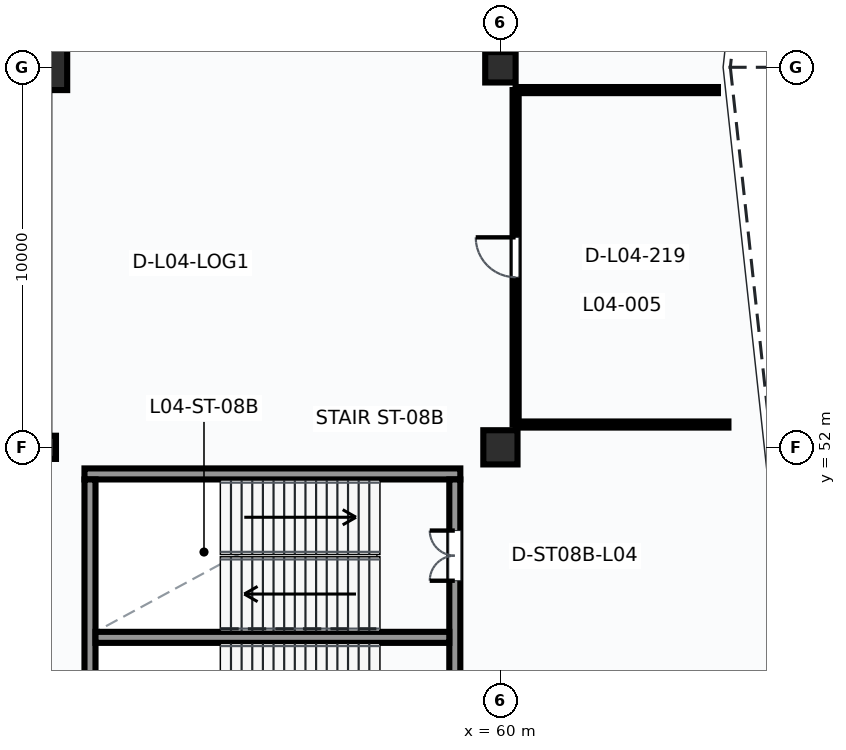
"""IFC4 building model, lengths in metres.
Left out: names, types, materials, properties, quantities, classifications, styles, units other than length and angle.
Written with IfcOpenShell. Run it as: python <this file> out.ifc"""

import sys

from ifc_helpers import new_model, si_unit, direction, frame, frame_2d, origin, origin_2d, place, context, subcontext, project, spatial, rectangle, circle, hollow_circle, extrude, element, fill, save


model = new_model("IFC4")
c1 = context("Model", 3, precision=1e-05, world=origin(), true_north=direction((0.0, 1.0)))
c2 = subcontext(c1, "Body", "Model", "MODEL_VIEW")
j1 = project(units=[si_unit("LENGTHUNIT", "METRE"), si_unit("PLANEANGLEUNIT", "RADIAN")], contexts=[c1])
p1 = place(None, origin())
s1 = spatial("IfcSite", under=j1, at=p1, CompositionType="ELEMENT")
p2 = place(p1, origin())
s2 = spatial("IfcBuilding", under=s1, at=p2, CompositionType="ELEMENT")
p3 = place(p2, frame((0.0, 0.0, 19.2)))
s3 = spatial("IfcBuildingStorey", under=s2, at=p3, CompositionType="ELEMENT", Elevation=19.2)
p4 = place(p3, frame((48.0, 52.0, 0.0), z_axis=(0.0, 0.0, 1.0), x_axis=(1.0, 0.0, 0.0)))
e1 = element("IfcColumn", 1, at=p4, inside=s3, PredefinedType="COLUMN", context=c2, shape_type="SweptSolid", body=[
    extrude(hollow_circle(Radius=0.305, WallThickness=0.025, at=origin_2d()), origin(), (0.0, 0.0, 1.0), 5.4),
])
p5 = place(p3, frame((48.0, 62.0, 0.0), z_axis=(0.0, 0.0, 1.0), x_axis=(1.0, 0.0, 0.0)))
e2 = element("IfcColumn", 2, at=p5, inside=s3, PredefinedType="COLUMN", context=c2, shape_type="SweptSolid", body=[
    extrude(rectangle(XDim=1.2, YDim=1.2, at=origin_2d()), origin(), (0.0, 0.0, 1.0), 5.4),
])
p6 = place(p3, frame((60.0, 52.0, 0.0), z_axis=(0.0, 0.0, 1.0), x_axis=(1.0, 0.0, 0.0)))
e3 = element("IfcColumn", 3, at=p6, inside=s3, PredefinedType="COLUMN", context=c2, shape_type="SweptSolid", body=[
    extrude(rectangle(XDim=0.9, YDim=0.9, at=origin_2d()), origin(), (0.0, 0.0, 1.0), 5.4),
])
p7 = place(p3, frame((60.0, 62.0, 0.0), z_axis=(0.0, 0.0, 1.0), x_axis=(1.0, 0.0, 0.0)))
e4 = element("IfcColumn", 4, at=p7, inside=s3, PredefinedType="COLUMN", context=c2, shape_type="SweptSolid", body=[
    extrude(circle(Radius=0.4, at=origin_2d()), origin(), (0.0, 0.0, 1.0), 5.4),
])
p8 = place(p3, frame((49.055, 51.3, 0.0), z_axis=(0.0, 0.0, 1.0), x_axis=(1.0, 0.0, 0.0)))
e5 = element("IfcWall", 5, at=p8, inside=s3, PredefinedType="SHEAR", context=c2, shape_type="SweptSolid", body=[
    extrude(rectangle(XDim=9.89, YDim=0.29, at=frame_2d((4.945, 0.0))), origin(), (0.0, 0.0, 1.0), 5.4),
])
p9 = place(p3, frame((49.2, 42.845, 0.0), z_axis=(0.0, 0.0, 1.0), x_axis=(0.0, 1.0, 0.0)))
e6 = element("IfcWall", 6, at=p9, inside=s3, PredefinedType="SHEAR", context=c2, shape_type="SweptSolid", body=[
    extrude(rectangle(XDim=8.31, YDim=0.29, at=frame_2d((4.155, 0.0))), origin(), (0.0, 0.0, 1.0), 5.4),
])
p10 = place(p3, frame((58.8, 42.845, 0.0), z_axis=(0.0, 0.0, 1.0), x_axis=(0.0, 1.0, 0.0)))
e7 = element("IfcWall", 7, at=p10, inside=s3, PredefinedType="SHEAR", context=c2, shape_type="SweptSolid", body=[
    extrude(rectangle(XDim=8.31, YDim=0.29, at=frame_2d((4.155, 0.0))), origin(), (0.0, 0.0, 1.0), 5.4),
])
p11 = place(p10, frame((1.305, 0.0, 0.0)))
e8 = element("IfcOpeningElement", 8, at=p11, cuts=e7, PredefinedType="OPENING", context=c2, shape_type="SweptSolid", body=[
    extrude(rectangle(XDim=1.4, YDim=2.2, at=frame_2d((0.7, 1.1))), frame((0.0, 0.155, 0.0), z_axis=(0.0, -1.0, 0.0), x_axis=(1.0, 0.0, 0.0)), (0.0, 0.0, 1.0), 0.31),
])
p12 = place(p10, frame((5.645, 0.0, 0.0)))
e9 = element("IfcOpeningElement", 9, at=p12, cuts=e7, PredefinedType="OPENING", context=c2, shape_type="SweptSolid", body=[
    extrude(rectangle(XDim=1.32, YDim=2.2, at=frame_2d((0.66, 1.1))), frame((0.0, 0.155, 0.0), z_axis=(0.0, -1.0, 0.0), x_axis=(1.0, 0.0, 0.0)), (0.0, 0.0, 1.0), 0.31),
])
p13 = place(p3, frame((49.345, 47.0, 0.0), z_axis=(0.0, 0.0, 1.0), x_axis=(1.0, 0.0, 0.0)))
e10 = element("IfcWall", 10, at=p13, inside=s3, PredefinedType="SHEAR", context=c2, shape_type="SweptSolid", body=[
    extrude(rectangle(XDim=9.31, YDim=0.29, at=frame_2d((4.655, 0.0))), origin(), (0.0, 0.0, 1.0), 5.4),
])
p14 = place(p3, frame((60.4, 52.6, 0.0), z_axis=(0.0, 0.0, 1.0), x_axis=(0.0, 1.0, 0.0)))
e11 = element("IfcWall", 11, at=p14, inside=s3, PredefinedType="PARTITIONING", context=c2, shape_type="SweptSolid", body=[
    extrude(rectangle(XDim=8.8, YDim=0.16, at=frame_2d((4.4, 0.0))), origin(), (0.0, 0.0, 1.0), 5.07),
])
p15 = place(p14, frame((3.875, 0.0, 0.0)))
e12 = element("IfcOpeningElement", 12, at=p15, cuts=e11, PredefinedType="OPENING", context=c2, shape_type="SweptSolid", body=[
    extrude(rectangle(XDim=1.05, YDim=2.2, at=frame_2d((0.525, 1.1))), frame((0.0, 0.09, 0.0), z_axis=(0.0, -1.0, 0.0), x_axis=(1.0, 0.0, 0.0)), (0.0, 0.0, 1.0), 0.18),
])
p16 = place(p3, frame((60.4, 61.4, 0.0), z_axis=(0.0, 0.0, 1.0), x_axis=(1.0, 0.0, 0.0)))
e13 = element("IfcWall", 13, at=p16, inside=s3, PredefinedType="PARTITIONING", context=c2, shape_type="SweptSolid", body=[
    extrude(rectangle(XDim=5.324, YDim=0.16, at=frame_2d((2.662, 0.0))), origin(), (0.0, 0.0, 1.0), 5.07),
])
p17 = place(p3, frame((66.0, 52.6, 0.0), z_axis=(0.0, 0.0, 1.0), x_axis=(-1.0, 0.0, 0.0)))
e14 = element("IfcWall", 14, at=p17, inside=s3, PredefinedType="PARTITIONING", context=c2, shape_type="SweptSolid", body=[
    extrude(rectangle(XDim=5.6, YDim=0.16, at=frame_2d((2.8, 0.0))), origin(), (0.0, 0.0, 1.0), 5.07),
])
p18 = place(p12, origin())
e15 = element("IfcDoor", 15, at=p18, inside=s3, OperationType="DOUBLE_DOOR_SINGLE_SWING", PredefinedType="DOOR", context=c2, shape_type="SweptSolid", body=[
    extrude(rectangle(XDim=1.32, YDim=2.2, at=frame_2d((0.66, 1.1))), frame((0.0, 0.025, 0.0), z_axis=(0.0, -1.0, 0.0), x_axis=(1.0, 0.0, 0.0)), (0.0, 0.0, 1.0), 0.05),
])
fill(e9, e15)
p19 = place(p15, origin())
e16 = element("IfcDoor", 16, at=p19, inside=s3, OperationType="SINGLE_SWING_RIGHT", PredefinedType="DOOR", context=c2, shape_type="SweptSolid", body=[
    extrude(rectangle(XDim=1.05, YDim=2.2, at=frame_2d((0.525, 1.1))), frame((0.0, 0.025, 0.0), z_axis=(0.0, -1.0, 0.0), x_axis=(1.0, 0.0, 0.0)), (0.0, 0.0, 1.0), 0.05),
])
fill(e12, e16)
save(model, sys.argv[1])
